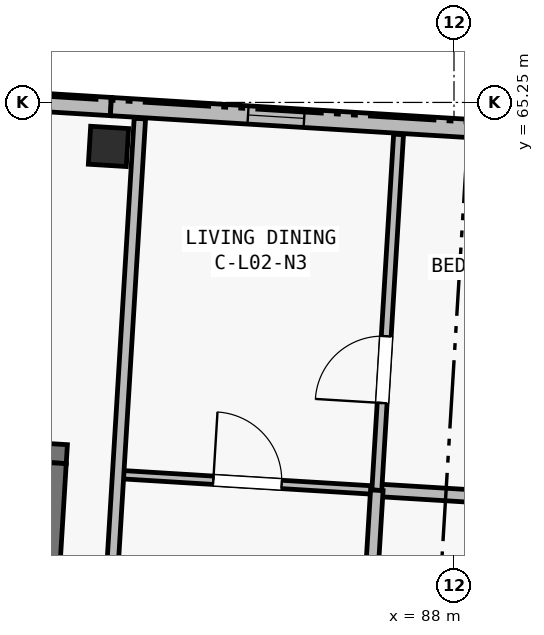
"""IFC4 building model, lengths in metres.
Left out: names, types, materials, properties, quantities, classifications, styles, units other than length and angle.
Written with IfcOpenShell. Run it as: python <this file> out.ifc"""

import sys

from ifc_helpers import new_model, si_unit, direction, frame, frame_2d, origin, origin_2d, place, context, subcontext, project, spatial, rectangle, extrude, element, fill, save


model = new_model("IFC4")
c1 = context("Model", 3, precision=1e-05, world=origin(), true_north=direction((0.0, 1.0)))
c2 = subcontext(c1, "Body", "Model", "MODEL_VIEW")
j1 = project(units=[si_unit("LENGTHUNIT", "METRE"), si_unit("PLANEANGLEUNIT", "RADIAN")], contexts=[c1])
p1 = place(None, origin())
s1 = spatial("IfcSite", under=j1, at=p1, CompositionType="ELEMENT")
p2 = place(p1, origin())
s2 = spatial("IfcBuilding", under=s1, at=p2, CompositionType="ELEMENT")
p3 = place(p2, frame((0.0, 0.0, 8.4)))
s3 = spatial("IfcBuildingStorey", under=s2, at=p3, CompositionType="ELEMENT", Elevation=8.4)
p4 = place(p3, frame((83.454, 64.672, 0.0), z_axis=(0.0, 0.0, 1.0), x_axis=(0.998134798422, -0.061048539535, 0.0)))
e1 = element("IfcColumn", 1, at=p4, inside=s3, PredefinedType="COLUMN", context=c2, shape_type="SweptSolid", body=[
    extrude(rectangle(XDim=0.5, YDim=0.5, at=origin_2d()), origin(), (0.0, 0.0, 1.0), 3.25),
])
p5 = place(p3, frame((75.919, 61.05, 0.0), z_axis=(0.0, 0.0, 1.0), x_axis=(0.998135546153, -0.061036313012, 0.0)))
e2 = element("IfcWall", 2, at=p5, inside=s3, PredefinedType="SHEAR", context=c2, shape_type="SweptSolid", body=[
    extrude(rectangle(XDim=7.0, YDim=0.25, at=frame_2d((3.5, 0.0))), origin(), (0.0, 0.0, 1.0), 3.25),
])
p6 = place(p5, frame((0.45, 0.0, 0.0)))
e3 = element("IfcOpeningElement", 3, at=p6, cuts=e2, PredefinedType="OPENING", context=c2, shape_type="SweptSolid", body=[
    extrude(rectangle(XDim=0.9, YDim=2.1, at=frame_2d((0.45, 1.05))), frame((0.0, 0.14, 0.0), z_axis=(0.0, -1.0, 0.0), x_axis=(1.0, 0.0, 0.0)), (0.0, 0.0, 1.0), 0.28),
])
p7 = place(p3, frame((82.599, 57.661, 0.0), z_axis=(0.0, 0.0, 1.0), x_axis=(0.06107697143, 0.998133059046, 0.0)))
e4 = element("IfcWall", 4, at=p7, inside=s3, PredefinedType="SHEAR", context=c2, shape_type="SweptSolid", body=[
    extrude(rectangle(XDim=2.85, YDim=0.25, at=frame_2d((1.425, 0.0))), origin(), (0.0, 0.0, 1.0), 3.25),
])
p8 = place(p3, frame((81.115, 65.341, 0.0), z_axis=(0.0, 0.0, 1.0), x_axis=(0.998134103342, -0.061059902923, 0.0)))
e5 = element("IfcWall", 5, at=p8, inside=s3, PredefinedType="SOLIDWALL", context=c2, shape_type="SweptSolid", body=[
    extrude(rectangle(XDim=2.375, YDim=0.24, at=frame_2d((1.188, 0.0))), origin(), (0.0, 0.0, 1.0), 3.0),
])
p9 = place(p3, frame((83.486, 65.196, 0.0), z_axis=(0.0, 0.0, 1.0), x_axis=(0.998135669243, -0.061034300063, 0.0)))
e6 = element("IfcWall", 6, at=p9, inside=s3, PredefinedType="SOLIDWALL", context=c2, shape_type="SweptSolid", body=[
    extrude(rectangle(XDim=7.6, YDim=0.24, at=frame_2d((3.8, 0.0))), origin(), (0.0, 0.0, 1.0), 3.0),
])
p10 = place(p9, frame((1.807, 0.0, 0.5)))
e7 = element("IfcOpeningElement", 7, at=p10, cuts=e6, PredefinedType="OPENING", context=c2, shape_type="SweptSolid", body=[
    extrude(rectangle(XDim=0.74, YDim=2.26, at=frame_2d((0.37, 1.13))), frame((0.0, 0.135, 0.0), z_axis=(0.0, -1.0, 0.0), x_axis=(1.0, 0.0, 0.0)), (0.0, 0.0, 1.0), 0.27),
])
p11 = place(p9, frame((5.006, 0.0, 0.44)))
e8 = element("IfcOpeningElement", 8, at=p11, cuts=e6, PredefinedType="OPENING", context=c2, shape_type="SweptSolid", body=[
    extrude(rectangle(XDim=0.82, YDim=2.18, at=frame_2d((0.41, 1.09))), frame((0.0, 0.135, 0.0), z_axis=(0.0, -1.0, 0.0), x_axis=(1.0, 0.0, 0.0)), (0.0, 0.0, 1.0), 0.27),
])
p12 = place(p3, frame((83.581, 60.356, 0.0), z_axis=(0.0, 0.0, 1.0), x_axis=(0.998133350094, -0.061072214879, 0.0)))
e9 = element("IfcWall", 9, at=p12, inside=s3, PredefinedType="PARTITIONING", context=c2, shape_type="SweptSolid", body=[
    extrude(rectangle(XDim=3.41, YDim=0.11, at=frame_2d((1.705, 0.0))), origin(), (0.0, 0.0, 1.0), 2.97),
])
p13 = place(p12, frame((1.255, 0.0, 0.0)))
e10 = element("IfcOpeningElement", 10, at=p13, cuts=e9, PredefinedType="OPENING", context=c2, shape_type="SweptSolid", body=[
    extrude(rectangle(XDim=0.9, YDim=2.1, at=frame_2d((0.45, 1.05))), frame((0.0, 0.07, 0.0), z_axis=(0.0, -1.0, 0.0), x_axis=(1.0, 0.0, 0.0)), (0.0, 0.0, 1.0), 0.14),
])
p14 = place(p3, frame((86.984, 60.147, 0.0), z_axis=(0.0, 0.0, 1.0), x_axis=(0.99813797838, -0.060996525433, 0.0)))
e11 = element("IfcWall", 11, at=p14, inside=s3, PredefinedType="PLUMBINGWALL", context=c2, shape_type="SweptSolid", body=[
    extrude(rectangle(XDim=3.41, YDim=0.165, at=frame_2d((1.705, 0.0))), origin(), (0.0, 0.0, 1.0), 2.97),
])
p15 = place(p14, frame((1.295, 0.0, 0.0)))
e12 = element("IfcOpeningElement", 12, at=p15, cuts=e11, PredefinedType="OPENING", context=c2, shape_type="SweptSolid", body=[
    extrude(rectangle(XDim=0.82, YDim=2.08, at=frame_2d((0.41, 1.04))), frame((0.0, 0.097, 0.0), z_axis=(0.0, -1.0, 0.0), x_axis=(1.0, 0.0, 0.0)), (0.0, 0.0, 1.0), 0.195),
])
p16 = place(p3, frame((86.984, 60.147, 0.0), z_axis=(0.0, 0.0, 1.0), x_axis=(0.061059262019, 0.998134142549, 0.0)))
e13 = element("IfcWall", 13, at=p16, inside=s3, PredefinedType="PARTITIONING", context=c2, shape_type="SweptSolid", body=[
    extrude(rectangle(XDim=4.69, YDim=0.13, at=frame_2d((2.345, 0.0))), origin(), (0.0, 0.0, 1.0), 2.97),
])
p17 = place(p16, frame((1.15, 0.0, 0.0)))
e14 = element("IfcOpeningElement", 14, at=p17, cuts=e13, PredefinedType="OPENING", context=c2, shape_type="SweptSolid", body=[
    extrude(rectangle(XDim=0.88, YDim=2.1, at=frame_2d((0.44, 1.05))), frame((0.0, 0.08, 0.0), z_axis=(0.0, -1.0, 0.0), x_axis=(1.0, 0.0, 0.0)), (0.0, 0.0, 1.0), 0.16),
])
p18 = place(p3, frame((86.668, 54.977, 0.0), z_axis=(0.0, 0.0, 1.0), x_axis=(0.061037231879, 0.998135489963, 0.0)))
e15 = element("IfcWall", 15, at=p18, inside=s3, PredefinedType="PLUMBINGWALL", context=c2, shape_type="SweptSolid", body=[
    extrude(rectangle(XDim=5.18, YDim=0.165, at=frame_2d((2.59, 0.0))), origin(), (0.0, 0.0, 1.0), 2.97),
])
p19 = place(p3, frame((83.265, 55.185, 0.0), z_axis=(0.0, 0.0, 1.0), x_axis=(0.061046193261, 0.998134941923, 0.0)))
e16 = element("IfcWall", 16, at=p19, inside=s3, PredefinedType="PARTITIONING", context=c2, shape_type="SweptSolid", body=[
    extrude(rectangle(XDim=9.87, YDim=0.15, at=frame_2d((4.935, 0.0))), origin(), (0.0, 0.0, 1.0), 2.97),
])
p20 = place(p10, origin())
e17 = element("IfcWindow", 17, at=p20, inside=s3, PartitioningType="SINGLE_PANEL", PredefinedType="WINDOW", context=c2, shape_type="SweptSolid", body=[
    extrude(rectangle(XDim=0.74, YDim=2.26, at=frame_2d((0.37, 1.13))), frame((0.0, 0.03, 0.0), z_axis=(0.0, -1.0, 0.0), x_axis=(1.0, 0.0, 0.0)), (0.0, 0.0, 1.0), 0.06),
])
fill(e7, e17)
p21 = place(p13, origin())
e18 = element("IfcDoor", 18, at=p21, inside=s3, OperationType="SINGLE_SWING_LEFT", PredefinedType="DOOR", context=c2, shape_type="SweptSolid", body=[
    extrude(rectangle(XDim=0.9, YDim=2.1, at=frame_2d((0.45, 1.05))), frame((0.0, 0.025, 0.0), z_axis=(0.0, -1.0, 0.0), x_axis=(1.0, 0.0, 0.0)), (0.0, 0.0, 1.0), 0.05),
])
fill(e10, e18)
p22 = place(p17, origin())
e19 = element("IfcDoor", 19, at=p22, inside=s3, OperationType="SINGLE_SWING_LEFT", PredefinedType="DOOR", context=c2, shape_type="SweptSolid", body=[
    extrude(rectangle(XDim=0.88, YDim=2.1, at=frame_2d((0.44, 1.05))), frame((0.0, 0.025, 0.0), z_axis=(0.0, -1.0, 0.0), x_axis=(1.0, 0.0, 0.0)), (0.0, 0.0, 1.0), 0.05),
])
fill(e14, e19)
save(model, sys.argv[1])
